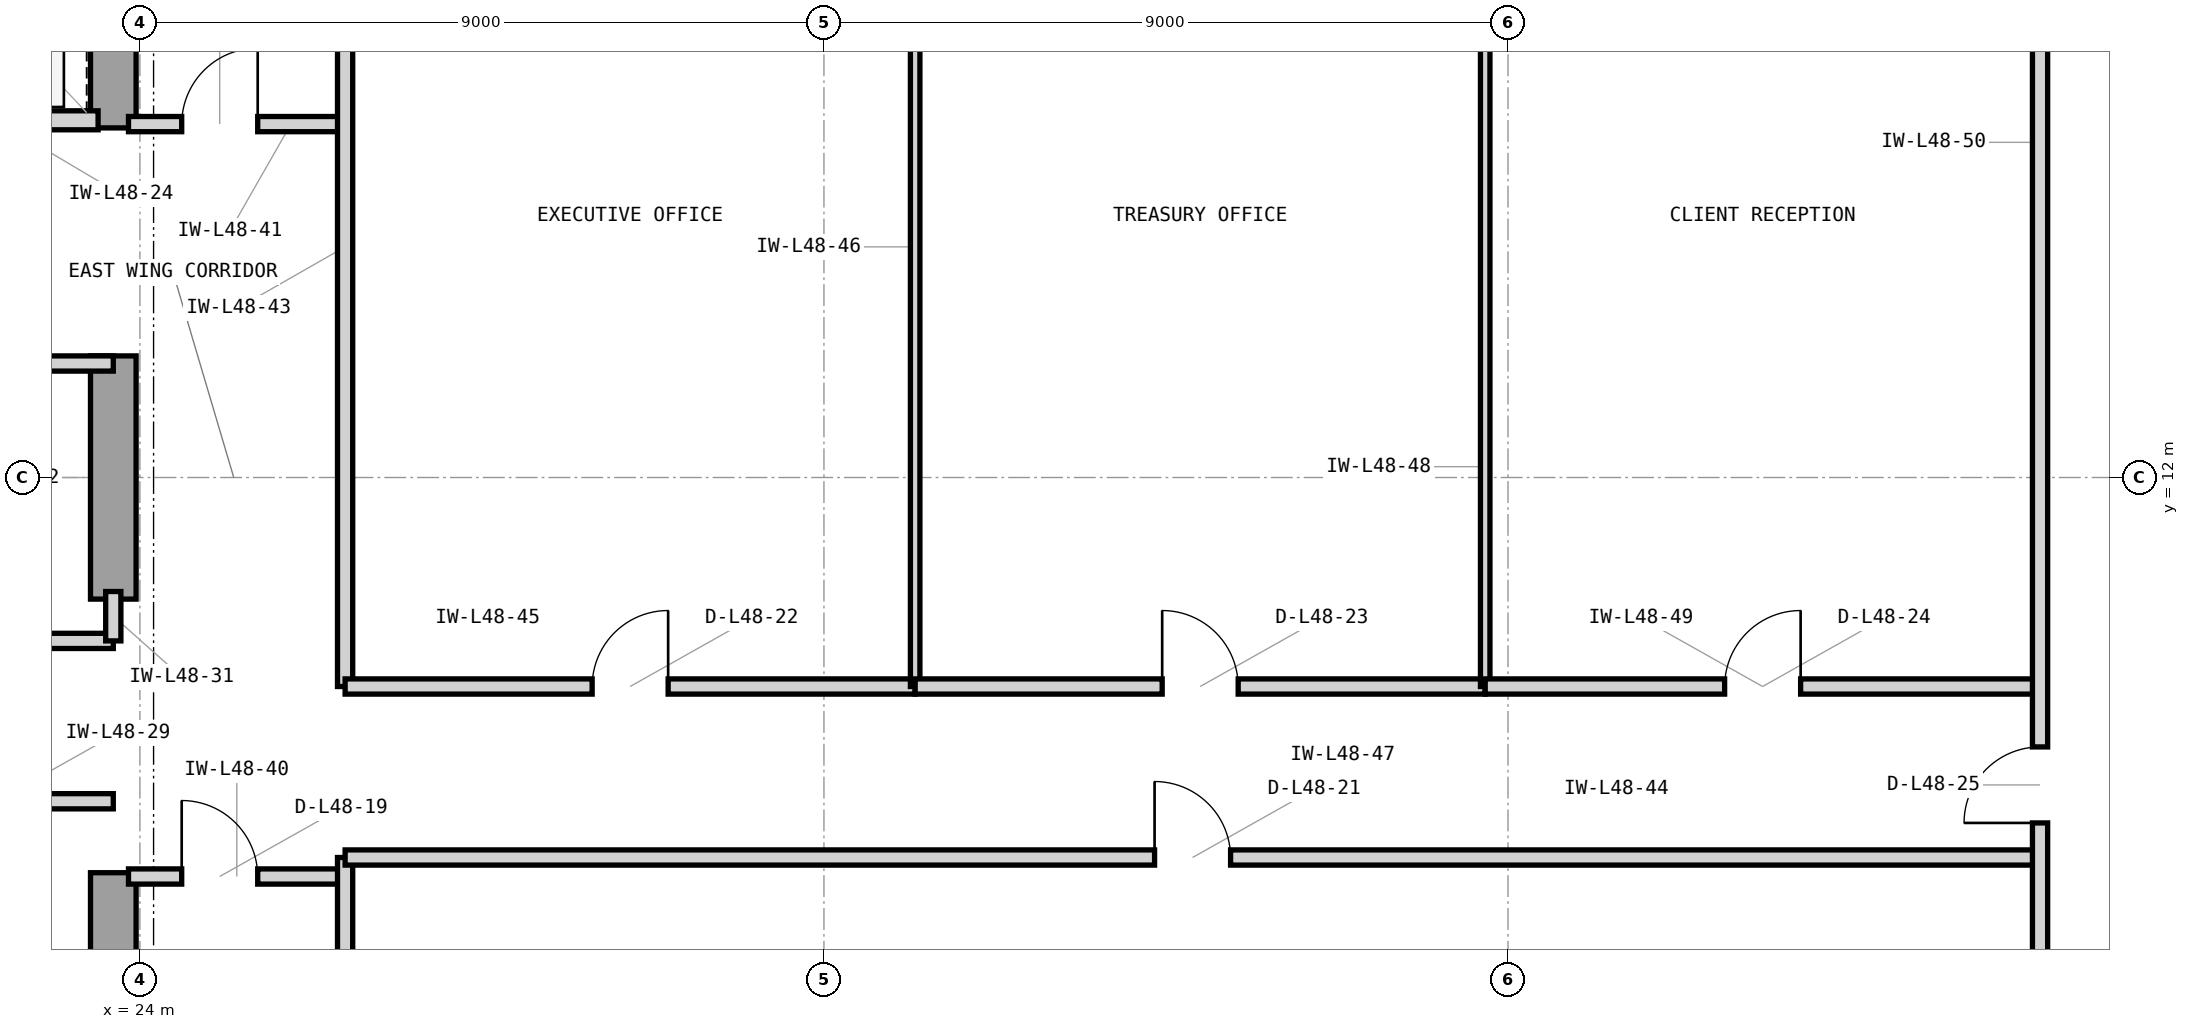
"""IFC4 building model, lengths in metres.
Left out: names, types, materials, properties, quantities, classifications, styles, units other than length and angle.
Written with IfcOpenShell. Run it as: python <this file> out.ifc"""

import sys

from ifc_helpers import new_model, si_unit, direction, frame, frame_2d, origin, place, context, subcontext, project, spatial, rectangle, extrude, element, fill, save


model = new_model("IFC4")
c1 = context("Model", 3, precision=1e-05, world=origin(), true_north=direction((0.0, 1.0)))
c2 = subcontext(c1, "Body", "Model", "MODEL_VIEW")
j1 = project(units=[si_unit("LENGTHUNIT", "METRE"), si_unit("PLANEANGLEUNIT", "RADIAN")], contexts=[c1])
p1 = place(None, origin())
s1 = spatial("IfcSite", under=j1, at=p1, CompositionType="ELEMENT")
p2 = place(p1, origin())
s2 = spatial("IfcBuilding", under=s1, at=p2, CompositionType="ELEMENT")
p3 = place(p2, frame((0.0, 0.0, 199.5)))
s3 = spatial("IfcBuildingStorey", under=s2, at=p3, CompositionType="ELEMENT", Elevation=199.5)
p4 = place(p3, frame((23.65, 3.65, 0.0), z_axis=(0.0, 0.0, 1.0), x_axis=(0.0, 1.0, 0.0)))
e1 = element("IfcWall", 1, at=p4, inside=s3, PredefinedType="SHEAR", context=c2, shape_type="SweptSolid", body=[
    extrude(rectangle(XDim=3.15, YDim=0.6, at=frame_2d((1.575, 0.0))), origin(), (0.0, 0.0, 1.0), 3.9),
])
p5 = place(p3, frame((23.65, 10.4, 0.0), z_axis=(0.0, 0.0, 1.0), x_axis=(0.0, 1.0, 0.0)))
e2 = element("IfcWall", 2, at=p5, inside=s3, PredefinedType="SHEAR", context=c2, shape_type="SweptSolid", body=[
    extrude(rectangle(XDim=3.2, YDim=0.6, at=frame_2d((1.6, 0.0))), origin(), (0.0, 0.0, 1.0), 3.9),
])
p6 = place(p3, frame((23.65, 16.6, 0.0), z_axis=(0.0, 0.0, 1.0), x_axis=(0.0, 1.0, 0.0)))
e3 = element("IfcWall", 3, at=p6, inside=s3, PredefinedType="SHEAR", context=c2, shape_type="SweptSolid", body=[
    extrude(rectangle(XDim=4.05, YDim=0.6, at=frame_2d((2.025, 0.0))), origin(), (0.0, 0.0, 1.0), 3.9),
])
p7 = place(p3, frame((21.05, 16.7, 0.0), z_axis=(0.0, 0.0, 1.0), x_axis=(1.0, 0.0, 0.0)))
e4 = element("IfcWall", 4, at=p7, inside=s3, PredefinedType="PARTITIONING", context=c2, shape_type="SweptSolid", body=[
    extrude(rectangle(XDim=2.4, YDim=0.25, at=frame_2d((1.2, 0.0))), origin(), (0.0, 0.0, 1.0), 3.283),
])
p8 = place(p7, frame((0.52, 0.0, 0.0)))
e5 = element("IfcOpeningElement", 5, at=p8, cuts=e4, PredefinedType="OPENING", context=c2, shape_type="SweptSolid", body=[
    extrude(rectangle(XDim=1.15, YDim=2.25, at=frame_2d((0.575, 1.125))), frame((0.0, 0.135, 0.0), z_axis=(0.0, -1.0, 0.0), x_axis=(1.0, 0.0, 0.0)), (0.0, 0.0, 1.0), 0.27),
])
p9 = place(p3, frame((17.5, 7.74, 0.0), z_axis=(0.0, 0.0, 1.0), x_axis=(1.0, 0.0, 0.0)))
e6 = element("IfcWall", 6, at=p9, inside=s3, PredefinedType="PARTITIONING", context=c2, shape_type="SweptSolid", body=[
    extrude(rectangle(XDim=6.15, YDim=0.2, at=frame_2d((3.075, 0.0))), origin(), (0.0, 0.0, 1.0), 3.69),
])
p10 = place(p9, frame((2.575, 0.0, 0.0)))
e7 = element("IfcOpeningElement", 7, at=p10, cuts=e6, PredefinedType="OPENING", context=c2, shape_type="SweptSolid", body=[
    extrude(rectangle(XDim=1.0, YDim=2.15, at=frame_2d((0.5, 1.075))), frame((0.0, 0.11, 0.0), z_axis=(0.0, -1.0, 0.0), x_axis=(1.0, 0.0, 0.0)), (0.0, 0.0, 1.0), 0.22),
])
p11 = place(p3, frame((14.825, 9.85, 0.0), z_axis=(0.0, 0.0, 1.0), x_axis=(1.0, 0.0, 0.0)))
e8 = element("IfcWall", 8, at=p11, inside=s3, PredefinedType="PARTITIONING", context=c2, shape_type="SweptSolid", body=[
    extrude(rectangle(XDim=8.825, YDim=0.2, at=frame_2d((4.413, 0.0))), origin(), (0.0, 0.0, 1.0), 3.69),
])
p12 = place(p3, frame((23.65, 9.85, 0.0), z_axis=(0.0, 0.0, 1.0), x_axis=(0.0, 1.0, 0.0)))
e9 = element("IfcWall", 9, at=p12, inside=s3, PredefinedType="PARTITIONING", context=c2, shape_type="SweptSolid", body=[
    extrude(rectangle(XDim=0.65, YDim=0.2, at=frame_2d((0.325, 0.0))), origin(), (0.0, 0.0, 1.0), 3.69),
])
p13 = place(p3, frame((19.9, 13.5, 0.0), z_axis=(0.0, 0.0, 1.0), x_axis=(1.0, 0.0, 0.0)))
e10 = element("IfcWall", 10, at=p13, inside=s3, PredefinedType="PARTITIONING", context=c2, shape_type="SweptSolid", body=[
    extrude(rectangle(XDim=3.75, YDim=0.2, at=frame_2d((1.875, 0.0))), origin(), (0.0, 0.0, 1.0), 3.283),
])
p14 = place(p13, frame((1.4, 0.0, 0.0)))
e11 = element("IfcOpeningElement", 11, at=p14, cuts=e10, PredefinedType="OPENING", context=c2, shape_type="SweptSolid", body=[
    extrude(rectangle(XDim=0.95, YDim=2.1, at=frame_2d((0.475, 1.05))), frame((0.0, 0.11, 0.0), z_axis=(0.0, -1.0, 0.0), x_axis=(1.0, 0.0, 0.0)), (0.0, 0.0, 1.0), 0.22),
])
p15 = place(p3, frame((23.85, 6.75, 0.0), z_axis=(0.0, 0.0, 1.0), x_axis=(1.0, 0.0, 0.0)))
e12 = element("IfcWall", 12, at=p15, inside=s3, PredefinedType="PARTITIONING", context=c2, shape_type="SweptSolid", body=[
    extrude(rectangle(XDim=2.85, YDim=0.2, at=frame_2d((1.425, 0.0))), origin(), (0.0, 0.0, 1.0), 3.69),
])
p16 = place(p15, frame((0.7, 0.0, 0.0)))
e13 = element("IfcOpeningElement", 13, at=p16, cuts=e12, PredefinedType="OPENING", context=c2, shape_type="SweptSolid", body=[
    extrude(rectangle(XDim=1.0, YDim=2.15, at=frame_2d((0.5, 1.075))), frame((0.0, 0.11, 0.0), z_axis=(0.0, -1.0, 0.0), x_axis=(1.0, 0.0, 0.0)), (0.0, 0.0, 1.0), 0.22),
])
p17 = place(p3, frame((23.85, 16.65, 0.0), z_axis=(0.0, 0.0, 1.0), x_axis=(1.0, 0.0, 0.0)))
e14 = element("IfcWall", 14, at=p17, inside=s3, PredefinedType="PARTITIONING", context=c2, shape_type="SweptSolid", body=[
    extrude(rectangle(XDim=2.85, YDim=0.2, at=frame_2d((1.425, 0.0))), origin(), (0.0, 0.0, 1.0), 3.69),
])
p18 = place(p17, frame((0.7, 0.0, 0.0)))
e15 = element("IfcOpeningElement", 15, at=p18, cuts=e14, PredefinedType="OPENING", context=c2, shape_type="SweptSolid", body=[
    extrude(rectangle(XDim=1.0, YDim=2.15, at=frame_2d((0.5, 1.075))), frame((0.0, 0.11, 0.0), z_axis=(0.0, -1.0, 0.0), x_axis=(1.0, 0.0, 0.0)), (0.0, 0.0, 1.0), 0.22),
])
p19 = place(p3, frame((26.7, 3.18, 0.0), z_axis=(0.0, 0.0, 1.0), x_axis=(0.0, 1.0, 0.0)))
e16 = element("IfcWall", 16, at=p19, inside=s3, PredefinedType="PARTITIONING", context=c2, shape_type="SweptSolid", body=[
    extrude(rectangle(XDim=3.82, YDim=0.2, at=frame_2d((1.91, 0.0))), origin(), (0.0, 0.0, 1.0), 3.69),
])
p20 = place(p3, frame((26.7, 9.25, 0.0), z_axis=(0.0, 0.0, 1.0), x_axis=(0.0, 1.0, 0.0)))
e17 = element("IfcWall", 17, at=p20, inside=s3, PredefinedType="PARTITIONING", context=c2, shape_type="SweptSolid", body=[
    extrude(rectangle(XDim=11.57, YDim=0.2, at=frame_2d((5.785, 0.0))), origin(), (0.0, 0.0, 1.0), 3.69),
])
p21 = place(p3, frame((26.7, 7.0, 0.0), z_axis=(0.0, 0.0, 1.0), x_axis=(1.0, 0.0, 0.0)))
e18 = element("IfcWall", 18, at=p21, inside=s3, PredefinedType="PARTITIONING", context=c2, shape_type="SweptSolid", body=[
    extrude(rectangle(XDim=22.3, YDim=0.2, at=frame_2d((11.15, 0.0))), origin(), (0.0, 0.0, 1.0), 3.69),
])
p22 = place(p21, frame((10.65, 0.0, 0.0)))
e19 = element("IfcOpeningElement", 19, at=p22, cuts=e18, PredefinedType="OPENING", context=c2, shape_type="SweptSolid", body=[
    extrude(rectangle(XDim=1.0, YDim=2.15, at=frame_2d((0.5, 1.075))), frame((0.0, 0.11, 0.0), z_axis=(0.0, -1.0, 0.0), x_axis=(1.0, 0.0, 0.0)), (0.0, 0.0, 1.0), 0.22),
])
p23 = place(p3, frame((26.7, 9.25, 0.0), z_axis=(0.0, 0.0, 1.0), x_axis=(1.0, 0.0, 0.0)))
e20 = element("IfcWall", 20, at=p23, inside=s3, PredefinedType="PARTITIONING", context=c2, shape_type="SweptSolid", body=[
    extrude(rectangle(XDim=7.5, YDim=0.2, at=frame_2d((3.75, 0.0))), origin(), (0.0, 0.0, 1.0), 3.69),
])
p24 = place(p23, frame((3.25, 0.0, 0.0)))
e21 = element("IfcOpeningElement", 21, at=p24, cuts=e20, PredefinedType="OPENING", context=c2, shape_type="SweptSolid", body=[
    extrude(rectangle(XDim=1.0, YDim=2.15, at=frame_2d((0.5, 1.075))), frame((0.0, 0.11, 0.0), z_axis=(0.0, -1.0, 0.0), x_axis=(1.0, 0.0, 0.0)), (0.0, 0.0, 1.0), 0.22),
])
p25 = place(p3, frame((34.2, 9.25, 0.0), z_axis=(0.0, 0.0, 1.0), x_axis=(0.0, 1.0, 0.0)))
e22 = element("IfcWall", 22, at=p25, inside=s3, PredefinedType="PARTITIONING", context=c2, shape_type="SweptSolid", body=[
    extrude(rectangle(XDim=11.57, YDim=0.125, at=frame_2d((5.785, 0.0))), origin(), (0.0, 0.0, 1.0), 3.69),
])
p26 = place(p3, frame((34.2, 9.25, 0.0), z_axis=(0.0, 0.0, 1.0), x_axis=(1.0, 0.0, 0.0)))
e23 = element("IfcWall", 23, at=p26, inside=s3, PredefinedType="PARTITIONING", context=c2, shape_type="SweptSolid", body=[
    extrude(rectangle(XDim=7.5, YDim=0.2, at=frame_2d((3.75, 0.0))), origin(), (0.0, 0.0, 1.0), 3.69),
])
p27 = place(p26, frame((3.25, 0.0, 0.0)))
e24 = element("IfcOpeningElement", 24, at=p27, cuts=e23, PredefinedType="OPENING", context=c2, shape_type="SweptSolid", body=[
    extrude(rectangle(XDim=1.0, YDim=2.15, at=frame_2d((0.5, 1.075))), frame((0.0, 0.11, 0.0), z_axis=(0.0, -1.0, 0.0), x_axis=(1.0, 0.0, 0.0)), (0.0, 0.0, 1.0), 0.22),
])
p28 = place(p3, frame((41.7, 9.25, 0.0), z_axis=(0.0, 0.0, 1.0), x_axis=(0.0, 1.0, 0.0)))
e25 = element("IfcWall", 25, at=p28, inside=s3, PredefinedType="PARTITIONING", context=c2, shape_type="SweptSolid", body=[
    extrude(rectangle(XDim=11.57, YDim=0.125, at=frame_2d((5.785, 0.0))), origin(), (0.0, 0.0, 1.0), 3.69),
])
p29 = place(p3, frame((41.7, 9.25, 0.0), z_axis=(0.0, 0.0, 1.0), x_axis=(1.0, 0.0, 0.0)))
e26 = element("IfcWall", 26, at=p29, inside=s3, PredefinedType="PARTITIONING", context=c2, shape_type="SweptSolid", body=[
    extrude(rectangle(XDim=7.3, YDim=0.2, at=frame_2d((3.65, 0.0))), origin(), (0.0, 0.0, 1.0), 3.69),
])
p30 = place(p29, frame((3.15, 0.0, 0.0)))
e27 = element("IfcOpeningElement", 27, at=p30, cuts=e26, PredefinedType="OPENING", context=c2, shape_type="SweptSolid", body=[
    extrude(rectangle(XDim=1.0, YDim=2.15, at=frame_2d((0.5, 1.075))), frame((0.0, 0.11, 0.0), z_axis=(0.0, -1.0, 0.0), x_axis=(1.0, 0.0, 0.0)), (0.0, 0.0, 1.0), 0.22),
])
p31 = place(p3, frame((49.0, 3.18, 0.0), z_axis=(0.0, 0.0, 1.0), x_axis=(0.0, 1.0, 0.0)))
e28 = element("IfcWall", 28, at=p31, inside=s3, PredefinedType="PARTITIONING", context=c2, shape_type="SweptSolid", body=[
    extrude(rectangle(XDim=17.64, YDim=0.2, at=frame_2d((8.82, 0.0))), origin(), (0.0, 0.0, 1.0), 3.69),
])
p32 = place(p31, frame((4.275, 0.0, 0.0)))
e29 = element("IfcOpeningElement", 29, at=p32, cuts=e28, PredefinedType="OPENING", context=c2, shape_type="SweptSolid", body=[
    extrude(rectangle(XDim=1.0, YDim=2.15, at=frame_2d((0.5, 1.075))), frame((0.0, 0.11, 0.0), z_axis=(0.0, -1.0, 0.0), x_axis=(1.0, 0.0, 0.0)), (0.0, 0.0, 1.0), 0.22),
])
p33 = place(p16, origin())
e30 = element("IfcDoor", 30, at=p33, inside=s3, OperationType="SINGLE_SWING_LEFT", PredefinedType="DOOR", context=c2, shape_type="SweptSolid", body=[
    extrude(rectangle(XDim=1.0, YDim=2.15, at=frame_2d((0.5, 1.075))), frame((0.0, 0.025, 0.0), z_axis=(0.0, -1.0, 0.0), x_axis=(1.0, 0.0, 0.0)), (0.0, 0.0, 1.0), 0.05),
])
fill(e13, e30)
p34 = place(p18, origin())
e31 = element("IfcDoor", 31, at=p34, inside=s3, OperationType="SINGLE_SWING_RIGHT", PredefinedType="DOOR", context=c2, shape_type="SweptSolid", body=[
    extrude(rectangle(XDim=1.0, YDim=2.15, at=frame_2d((0.5, 1.075))), frame((0.0, 0.025, 0.0), z_axis=(0.0, -1.0, 0.0), x_axis=(1.0, 0.0, 0.0)), (0.0, 0.0, 1.0), 0.05),
])
fill(e15, e31)
p35 = place(p22, origin())
e32 = element("IfcDoor", 32, at=p35, inside=s3, OperationType="SINGLE_SWING_LEFT", PredefinedType="DOOR", context=c2, shape_type="SweptSolid", body=[
    extrude(rectangle(XDim=1.0, YDim=2.15, at=frame_2d((0.5, 1.075))), frame((0.0, 0.025, 0.0), z_axis=(0.0, -1.0, 0.0), x_axis=(1.0, 0.0, 0.0)), (0.0, 0.0, 1.0), 0.05),
])
fill(e19, e32)
p36 = place(p24, origin())
e33 = element("IfcDoor", 33, at=p36, inside=s3, OperationType="SINGLE_SWING_RIGHT", PredefinedType="DOOR", context=c2, shape_type="SweptSolid", body=[
    extrude(rectangle(XDim=1.0, YDim=2.15, at=frame_2d((0.5, 1.075))), frame((0.0, 0.025, 0.0), z_axis=(0.0, -1.0, 0.0), x_axis=(1.0, 0.0, 0.0)), (0.0, 0.0, 1.0), 0.05),
])
fill(e21, e33)
p37 = place(p27, origin())
e34 = element("IfcDoor", 34, at=p37, inside=s3, OperationType="SINGLE_SWING_LEFT", PredefinedType="DOOR", context=c2, shape_type="SweptSolid", body=[
    extrude(rectangle(XDim=1.0, YDim=2.15, at=frame_2d((0.5, 1.075))), frame((0.0, 0.025, 0.0), z_axis=(0.0, -1.0, 0.0), x_axis=(1.0, 0.0, 0.0)), (0.0, 0.0, 1.0), 0.05),
])
fill(e24, e34)
p38 = place(p30, origin())
e35 = element("IfcDoor", 35, at=p38, inside=s3, OperationType="SINGLE_SWING_RIGHT", PredefinedType="DOOR", context=c2, shape_type="SweptSolid", body=[
    extrude(rectangle(XDim=1.0, YDim=2.15, at=frame_2d((0.5, 1.075))), frame((0.0, 0.025, 0.0), z_axis=(0.0, -1.0, 0.0), x_axis=(1.0, 0.0, 0.0)), (0.0, 0.0, 1.0), 0.05),
])
fill(e27, e35)
p39 = place(p32, origin())
e36 = element("IfcDoor", 36, at=p39, inside=s3, OperationType="SINGLE_SWING_LEFT", PredefinedType="DOOR", context=c2, shape_type="SweptSolid", body=[
    extrude(rectangle(XDim=1.0, YDim=2.15, at=frame_2d((0.5, 1.075))), frame((0.0, 0.025, 0.0), z_axis=(0.0, -1.0, 0.0), x_axis=(1.0, 0.0, 0.0)), (0.0, 0.0, 1.0), 0.05),
])
fill(e29, e36)
save(model, sys.argv[1])
